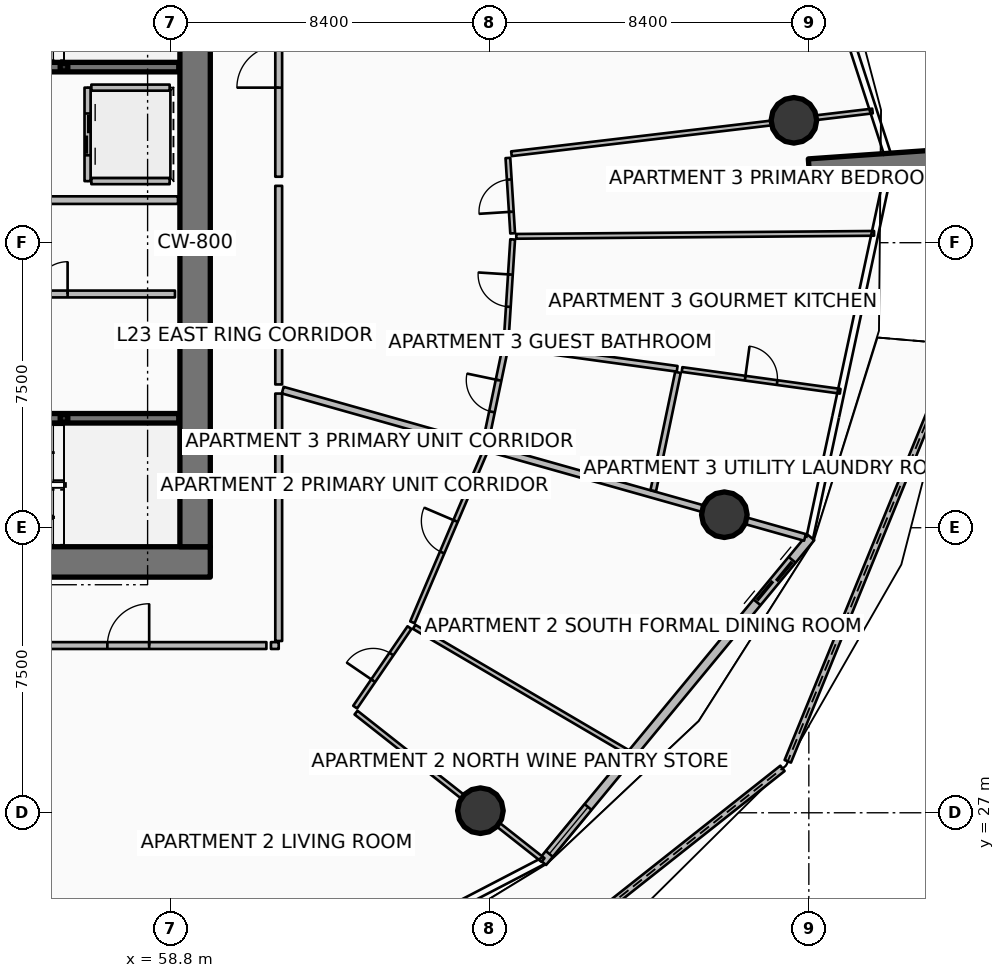
"""IFC4 building model, lengths in metres.
Left out: names, types, materials, properties, quantities, classifications, styles, units other than length and angle.
Written with IfcOpenShell. Run it as: python <this file> out.ifc"""

import sys

from ifc_helpers import new_model, si_unit, direction, frame, frame_2d, origin, origin_2d, place, context, subcontext, project, spatial, polyline, rectangle, hollow_rectangle, circle, outline, extrude, element, fill, save


model = new_model("IFC4")
c1 = context("Model", 3, precision=1e-05, world=origin(), true_north=direction((0.0, 1.0)))
c2 = subcontext(c1, "Body", "Model", "MODEL_VIEW")
j1 = project(units=[si_unit("LENGTHUNIT", "METRE"), si_unit("PLANEANGLEUNIT", "RADIAN")], contexts=[c1])
p1 = place(None, origin())
s1 = spatial("IfcSite", under=j1, at=p1, CompositionType="ELEMENT")
p2 = place(p1, origin())
s2 = spatial("IfcBuilding", under=s1, at=p2, CompositionType="ELEMENT")
p3 = place(p2, frame((0.0, 0.0, 93.9)))
s3 = spatial("IfcBuildingStorey", under=s2, at=p3, CompositionType="ELEMENT", Elevation=93.9)
p4 = place(p3, frame((49.95, 33.6, 0.0), z_axis=(0.0, 0.0, 1.0), x_axis=(1.0, 0.0, 0.0)))
e1 = element("IfcWall", 1, at=p4, inside=s3, PredefinedType="SHEAR", context=c2, shape_type="SweptSolid", body=[
    extrude(rectangle(XDim=9.9, YDim=0.8, at=frame_2d((4.95, 0.0))), origin(), (0.0, 0.0, 1.0), 3.75),
])
p5 = place(p3, frame((59.45, 34.0, 0.0), z_axis=(0.0, 0.0, 1.0), x_axis=(0.0, 1.0, 0.0)))
e2 = element("IfcWall", 2, at=p5, inside=s3, PredefinedType="SHEAR", context=c2, shape_type="SweptSolid", body=[
    extrude(rectangle(XDim=16.0, YDim=0.8, at=frame_2d((8.0, 0.0))), origin(), (0.0, 0.0, 1.0), 3.75),
])
for number, where, z_axis, x_axis in (
    (3, (56.0, 46.62, 0.0), (0.0, 0.0, 1.0), (1.0, 0.0, 0.0)),
    (4, (56.0, 37.38, 0.0), (0.0, 0.0, 1.0), (1.0, 0.0, 0.0)),
):
    element("IfcColumn", number, at=place(p3, frame(where, z_axis=z_axis, x_axis=x_axis)), inside=s3, PredefinedType="COLUMN", context=c2, shape_type="SweptSolid", body=[
        extrude(hollow_rectangle(XDim=0.2, YDim=0.2, WallThickness=0.01, InnerFilletRadius=0.01, OuterFilletRadius=0.02, at=origin_2d()), origin(), (0.0, 0.0, 1.0), 1.67),
    ])
p6 = place(p3, frame((75.606, 43.93, 0.0), z_axis=(0.0, 0.0, 1.0), x_axis=(0.997564163539, 0.069754853754, 0.0)))
e5 = element("IfcWall", 5, at=p6, inside=s3, PredefinedType="SOLIDWALL", context=c2, shape_type="SweptSolid", body=[
    extrude(rectangle(XDim=3.5, YDim=0.55, at=frame_2d((1.75, 0.0))), origin(), (0.0, 0.0, 1.0), 3.75),
])
for number, where, z_axis, x_axis in (
    (6, (66.958, 27.055, 0.0), (0.0, 0.0, 1.0), (1.0, 0.0, 0.0)),
    (7, (73.377, 34.843, 0.0), (0.0, 0.0, 1.0), (1.0, 0.0, 0.0)),
    (8, (75.207, 45.22, 0.0), (0.0, 0.0, 1.0), (1.0, 0.0, 0.0)),
):
    element("IfcColumn", number, at=place(p3, frame(where, z_axis=z_axis, x_axis=x_axis)), inside=s3, PredefinedType="COLUMN", context=c2, shape_type="SweptSolid", body=[
        extrude(circle(Radius=0.6, at=origin_2d()), origin(), (0.0, 0.0, 1.0), 3.5),
    ])
p7 = place(p3, frame((66.031, 21.148, 0.0), z_axis=(0.0, 0.0, 1.0), x_axis=(0.784321358075, 0.620354743084, 0.0)))
e9 = element("IfcWall", 9, at=p7, inside=s3, PredefinedType="PARAPET", context=c2, shape_type="SweptSolid", body=[
    extrude(outline(polyline([(0.0, 0.0), (11.316, 0.0), (11.316, 1.832), (5.658, 1.853), (0.0, 1.756), (0.0, 0.0)])), frame((0.0, 0.09, 0.0), z_axis=(0.0, -1.0, 0.0), x_axis=(1.0, 0.0, 0.0)), (0.0, 0.0, 1.0), 0.18),
])
p8 = place(p3, frame((75.046, 28.354, 0.0), z_axis=(0.0, 0.0, 1.0), x_axis=(0.378274271274, 0.925693564681, 0.0)))
e10 = element("IfcWall", 10, at=p8, inside=s3, PredefinedType="PARAPET", context=c2, shape_type="SweptSolid", body=[
    extrude(outline(polyline([(0.0, 0.0), (11.852, 0.0), (11.852, 1.497), (5.926, 1.696), (0.0, 1.832), (0.0, 0.0)])), frame((0.0, 0.09, 0.0), z_axis=(0.0, -1.0, 0.0), x_axis=(1.0, 0.0, 0.0)), (0.0, 0.0, 1.0), 0.18),
])
p9 = place(p3, frame((68.593, 25.702, 0.0), z_axis=(0.0, 0.0, 1.0), x_axis=(0.636704975, 0.771107498868, 0.0)))
e11 = element("IfcWall", 11, at=p9, inside=s3, PredefinedType="SOLIDWALL", context=c2, shape_type="SweptSolid", body=[
    extrude(rectangle(XDim=11.084, YDim=0.24, at=frame_2d((5.542, 0.0))), origin(), (0.0, 0.0, 1.0), 2.45),
])
p10 = place(p9, frame((8.864, 0.0, 0.0)))
e12 = element("IfcOpeningElement", 12, at=p10, cuts=e11, PredefinedType="OPENING", context=c2, shape_type="SweptSolid", body=[
    extrude(rectangle(XDim=1.45, YDim=2.15, at=frame_2d((0.725, 1.075))), frame((0.0, 0.13, 0.0), z_axis=(0.0, -1.0, 0.0), x_axis=(1.0, 0.0, 0.0)), (0.0, 0.0, 1.0), 0.26),
])
p11 = place(p9, frame((0.28, 0.0, 0.65)))
e13 = element("IfcOpeningElement", 13, at=p11, cuts=e11, PredefinedType="OPENING", context=c2, shape_type="SweptSolid", body=[
    extrude(rectangle(XDim=1.6, YDim=1.5, at=frame_2d((0.8, 0.75))), frame((0.0, 0.13, 0.0), z_axis=(0.0, -1.0, 0.0), x_axis=(1.0, 0.0, 0.0)), (0.0, 0.0, 1.0), 0.26),
])
p12 = place(p3, frame((51.48, 46.62, 0.0), z_axis=(0.0, 0.0, 1.0), x_axis=(1.0, 0.0, 0.0)))
e14 = element("IfcWall", 14, at=p12, inside=s3, PredefinedType="SOLIDWALL", context=c2, shape_type="SweptSolid", body=[
    extrude(rectangle(XDim=7.54, YDim=0.25, at=frame_2d((3.77, 0.0))), origin(), (0.0, 0.0, 1.0), 3.5),
])
p13 = place(p12, frame((0.3, 0.0, 0.0)))
e15 = element("IfcOpeningElement", 15, at=p13, cuts=e14, PredefinedType="OPENING", context=c2, shape_type="SweptSolid", body=[
    extrude(rectangle(XDim=1.55, YDim=2.15, at=frame_2d((0.775, 1.075))), frame((0.0, 0.135, 0.0), z_axis=(0.0, -1.0, 0.0), x_axis=(1.0, 0.0, 0.0)), (0.0, 0.0, 1.0), 0.27),
])
p14 = place(p3, frame((51.48, 37.38, 0.0), z_axis=(0.0, 0.0, 1.0), x_axis=(1.0, 0.0, 0.0)))
e16 = element("IfcWall", 16, at=p14, inside=s3, PredefinedType="SOLIDWALL", context=c2, shape_type="SweptSolid", body=[
    extrude(rectangle(XDim=7.54, YDim=0.25, at=frame_2d((3.77, 0.0))), origin(), (0.0, 0.0, 1.0), 3.5),
])
p15 = place(p14, frame((0.3, 0.0, 0.0)))
e17 = element("IfcOpeningElement", 17, at=p15, cuts=e16, PredefinedType="OPENING", context=c2, shape_type="SweptSolid", body=[
    extrude(rectangle(XDim=1.55, YDim=2.15, at=frame_2d((0.775, 1.075))), frame((0.0, 0.135, 0.0), z_axis=(0.0, -1.0, 0.0), x_axis=(1.0, 0.0, 0.0)), (0.0, 0.0, 1.0), 0.27),
])
p16 = place(p3, frame((56.62, 46.08, 0.0), z_axis=(0.0, 0.0, 1.0), x_axis=(0.0, -1.0, 0.0)))
e18 = element("IfcWall", 18, at=p16, inside=s3, PredefinedType="PARTITIONING", context=c2, shape_type="SweptSolid", body=[
    extrude(rectangle(XDim=2.46, YDim=0.16, at=frame_2d((1.23, 0.0))), origin(), (0.0, 0.0, 1.0), 3.5),
])
p17 = place(p16, frame((0.68, 0.0, 0.0)))
e19 = element("IfcOpeningElement", 19, at=p17, cuts=e18, PredefinedType="OPENING", context=c2, shape_type="SweptSolid", body=[
    extrude(rectangle(XDim=1.1, YDim=2.1, at=frame_2d((0.55, 1.05))), frame((0.0, 0.09, 0.0), z_axis=(0.0, -1.0, 0.0), x_axis=(1.0, 0.0, 0.0)), (0.0, 0.0, 1.0), 0.18),
])
for number, where, z_axis, x_axis in (
    (20, (56.72, 46.08, 0.0), (0.0, 0.0, 1.0), (1.0, 0.0, 0.0)),
    (21, (56.72, 43.62, 0.0), (0.0, 0.0, 1.0), (1.0, 0.0, 0.0)),
):
    element("IfcWall", number, at=place(p3, frame(where, z_axis=z_axis, x_axis=x_axis)), inside=s3, PredefinedType="PARTITIONING", context=c2, shape_type="SweptSolid", body=[
        extrude(rectangle(XDim=2.06, YDim=0.16, at=frame_2d((1.03, 0.0))), origin(), (0.0, 0.0, 1.0), 3.5),
    ])
p18 = place(p3, frame((52.42, 40.65, 0.0), z_axis=(0.0, 0.0, 1.0), x_axis=(1.0, 0.0, 0.0)))
e22 = element("IfcWall", 22, at=p18, inside=s3, PredefinedType="PARTITIONING", context=c2, shape_type="SweptSolid", body=[
    extrude(rectangle(XDim=6.5, YDim=0.18, at=frame_2d((3.25, 0.0))), origin(), (0.0, 0.0, 1.0), 3.5),
])
p19 = place(p18, frame((2.825, 0.0, 0.0)))
e23 = element("IfcOpeningElement", 23, at=p19, cuts=e22, PredefinedType="OPENING", context=c2, shape_type="SweptSolid", body=[
    extrude(rectangle(XDim=0.85, YDim=2.06, at=frame_2d((0.425, 1.03))), frame((0.0, 0.1, 0.0), z_axis=(0.0, -1.0, 0.0), x_axis=(1.0, 0.0, 0.0)), (0.0, 0.0, 1.0), 0.2),
])
p20 = place(p3, frame((50.12, 43.12, 0.0), z_axis=(0.0, 0.0, 1.0), x_axis=(1.0, 0.0, 0.0)))
e24 = element("IfcWall", 24, at=p20, inside=s3, PredefinedType="PARTITIONING", context=c2, shape_type="SweptSolid", body=[
    extrude(rectangle(XDim=8.88, YDim=0.2, at=frame_2d((4.44, 0.0))), origin(), (0.0, 0.0, 1.0), 3.5),
])
p21 = place(p3, frame((61.756, 38.12, 0.0), z_axis=(0.0, 0.0, 1.0), x_axis=(0.962455861176, -0.271438234756, 0.0)))
e25 = element("IfcWall", 25, at=p21, inside=s3, PredefinedType="PARTITIONING", context=c2, shape_type="SweptSolid", body=[
    extrude(rectangle(XDim=14.279, YDim=0.18, at=frame_2d((7.139, 0.0))), origin(), (0.0, 0.0, 1.0), 2.94),
])
p22 = place(p3, frame((54.056, 31.4, 0.0), z_axis=(0.0, 0.0, 1.0), x_axis=(1.0, 0.0, 0.0)))
e26 = element("IfcWall", 26, at=p22, inside=s3, PredefinedType="PARTITIONING", context=c2, shape_type="SweptSolid", body=[
    extrude(rectangle(XDim=7.27, YDim=0.18, at=frame_2d((3.635, 0.0))), origin(), (0.0, 0.0, 1.0), 2.94),
])
p23 = place(p22, frame((3.085, 0.0, 0.0)))
e27 = element("IfcOpeningElement", 27, at=p23, cuts=e26, PredefinedType="OPENING", context=c2, shape_type="SweptSolid", body=[
    extrude(rectangle(XDim=1.1, YDim=2.1, at=frame_2d((0.55, 1.05))), frame((0.0, 0.1, 0.0), z_axis=(0.0, -1.0, 0.0), x_axis=(1.0, 0.0, 0.0)), (0.0, 0.0, 1.0), 0.2),
])
p24 = place(p3, frame((61.446, 31.4, 0.0), z_axis=(0.0, 0.0, 1.0), x_axis=(1.0, 0.0, 0.0)))
e28 = element("IfcWall", 28, at=p24, inside=s3, PredefinedType="PARTITIONING", context=c2, shape_type="SweptSolid", body=[
    extrude(rectangle(XDim=0.204, YDim=0.18, at=frame_2d((0.102, 0.0))), origin(), (0.0, 0.0, 1.0), 2.94),
])
p25 = place(p3, frame((61.65, 31.52, 0.0), z_axis=(0.0, 0.0, 1.0), x_axis=(0.0, 1.0, 0.0)))
e29 = element("IfcWall", 29, at=p25, inside=s3, PredefinedType="PARTITIONING", context=c2, shape_type="SweptSolid", body=[
    extrude(rectangle(XDim=6.51, YDim=0.18, at=frame_2d((3.255, 0.0))), origin(), (0.0, 0.0, 1.0), 2.94),
])
p26 = place(p3, frame((63.684, 29.635, 0.0), z_axis=(0.0, 0.0, 1.0), x_axis=(0.785296487737, -0.619119880434, 0.0)))
e30 = element("IfcWall", 30, at=p26, inside=s3, PredefinedType="PARTITIONING", context=c2, shape_type="SweptSolid", body=[
    extrude(rectangle(XDim=6.266, YDim=0.125, at=frame_2d((3.133, 0.0))), origin(), (0.0, 0.0, 1.0), 2.94),
])
p27 = place(p3, frame((65.214, 31.893, 0.0), z_axis=(0.0, 0.0, 1.0), x_axis=(0.862328516234, -0.506349217527, 0.0)))
e31 = element("IfcWall", 31, at=p27, inside=s3, PredefinedType="PARTITIONING", context=c2, shape_type="SweptSolid", body=[
    extrude(rectangle(XDim=6.506, YDim=0.125, at=frame_2d((3.253, 0.0))), origin(), (0.0, 0.0, 1.0), 2.94),
])
p28 = place(p3, frame((63.662, 29.78, 0.0), z_axis=(0.0, 0.0, 1.0), x_axis=(0.56409306427, 0.825711217583, 0.0)))
e32 = element("IfcWall", 32, at=p28, inside=s3, PredefinedType="PARTITIONING", context=c2, shape_type="SweptSolid", body=[
    extrude(rectangle(XDim=2.534, YDim=0.125, at=frame_2d((1.267, 0.0))), origin(), (0.0, 0.0, 1.0), 2.94),
])
p29 = place(p28, frame((0.842, 0.0, 0.0)))
e33 = element("IfcOpeningElement", 33, at=p29, cuts=e32, PredefinedType="OPENING", context=c2, shape_type="SweptSolid", body=[
    extrude(rectangle(XDim=0.85, YDim=2.06, at=frame_2d((0.425, 1.03))), frame((0.0, 0.073, 0.0), z_axis=(0.0, -1.0, 0.0), x_axis=(1.0, 0.0, 0.0)), (0.0, 0.0, 1.0), 0.145),
])
p30 = place(p3, frame((65.168, 32.012, 0.0), z_axis=(0.0, 0.0, 1.0), x_axis=(0.392094288326, 0.91992503448, 0.0)))
e34 = element("IfcWall", 34, at=p30, inside=s3, PredefinedType="PARTITIONING", context=c2, shape_type="SweptSolid", body=[
    extrude(rectangle(XDim=4.894, YDim=0.125, at=frame_2d((2.447, 0.0))), origin(), (0.0, 0.0, 1.0), 2.94),
])
p31 = place(p30, frame((1.997, 0.0, 0.0)))
e35 = element("IfcOpeningElement", 35, at=p31, cuts=e34, PredefinedType="OPENING", context=c2, shape_type="SweptSolid", body=[
    extrude(rectangle(XDim=0.9, YDim=2.08, at=frame_2d((0.45, 1.04))), frame((0.0, 0.073, 0.0), z_axis=(0.0, -1.0, 0.0), x_axis=(1.0, 0.0, 0.0)), (0.0, 0.0, 1.0), 0.145),
])
p32 = place(p3, frame((61.65, 43.736, 0.0), z_axis=(0.0, 0.0, 1.0), x_axis=(0.0, 1.0, 0.0)))
e36 = element("IfcWall", 36, at=p32, inside=s3, PredefinedType="PARTITIONING", context=c2, shape_type="SweptSolid", body=[
    extrude(rectangle(XDim=5.789, YDim=0.18, at=frame_2d((2.895, 0.0))), origin(), (0.0, 0.0, 1.0), 2.94),
])
p33 = place(p32, frame((2.344, 0.0, 0.0)))
e37 = element("IfcOpeningElement", 37, at=p33, cuts=e36, PredefinedType="OPENING", context=c2, shape_type="SweptSolid", body=[
    extrude(rectangle(XDim=1.1, YDim=2.1, at=frame_2d((0.55, 1.05))), frame((0.0, 0.1, 0.0), z_axis=(0.0, -1.0, 0.0), x_axis=(1.0, 0.0, 0.0)), (0.0, 0.0, 1.0), 0.2),
])
p34 = place(p3, frame((61.65, 38.27, 0.0), z_axis=(0.0, 0.0, 1.0), x_axis=(0.0, 1.0, 0.0)))
e38 = element("IfcWall", 38, at=p34, inside=s3, PredefinedType="PARTITIONING", context=c2, shape_type="SweptSolid", body=[
    extrude(rectangle(XDim=5.225, YDim=0.18, at=frame_2d((2.613, 0.0))), origin(), (0.0, 0.0, 1.0), 2.94),
])
p35 = place(p3, frame((67.774, 44.341, 0.0), z_axis=(0.0, 0.0, 1.0), x_axis=(0.993071471329, 0.117511926341, 0.0)))
e39 = element("IfcWall", 39, at=p35, inside=s3, PredefinedType="PARTITIONING", context=c2, shape_type="SweptSolid", body=[
    extrude(rectangle(XDim=9.567, YDim=0.125, at=frame_2d((4.784, 0.0))), origin(), (0.0, 0.0, 1.0), 2.94),
])
p36 = place(p3, frame((67.089, 36.72, 0.0), z_axis=(0.0, 0.0, 1.0), x_axis=(0.204314138463, 0.978905374806, 0.0)))
e40 = element("IfcWall", 40, at=p36, inside=s3, PredefinedType="PARTITIONING", context=c2, shape_type="SweptSolid", body=[
    extrude(rectangle(XDim=2.546, YDim=0.15, at=frame_2d((1.273, 0.0))), origin(), (0.0, 0.0, 1.0), 2.94),
])
p37 = place(p36, frame((0.848, 0.0, 0.0)))
e41 = element("IfcOpeningElement", 41, at=p37, cuts=e40, PredefinedType="OPENING", context=c2, shape_type="SweptSolid", body=[
    extrude(rectangle(XDim=0.85, YDim=2.06, at=frame_2d((0.425, 1.03))), frame((0.0, 0.085, 0.0), z_axis=(0.0, -1.0, 0.0), x_axis=(1.0, 0.0, 0.0)), (0.0, 0.0, 1.0), 0.17),
])
p38 = place(p3, frame((71.506, 35.474, 0.0), z_axis=(0.0, 0.0, 1.0), x_axis=(0.204346617078, 0.978898595407, 0.0)))
e42 = element("IfcWall", 42, at=p38, inside=s3, PredefinedType="PARTITIONING", context=c2, shape_type="SweptSolid", body=[
    extrude(rectangle(XDim=3.18, YDim=0.15, at=frame_2d((1.59, 0.0))), origin(), (0.0, 0.0, 1.0), 2.94),
])
p39 = place(p3, frame((67.717, 39.289, 0.0), z_axis=(0.0, 0.0, 1.0), x_axis=(0.99067496126, -0.136246545396, 0.0)))
e43 = element("IfcWall", 43, at=p39, inside=s3, PredefinedType="PARTITIONING", context=c2, shape_type="SweptSolid", body=[
    extrude(rectangle(XDim=4.46, YDim=0.15, at=frame_2d((2.23, 0.0))), origin(), (0.0, 0.0, 1.0), 2.94),
])
p40 = place(p3, frame((72.264, 38.663, 0.0), z_axis=(0.0, 0.0, 1.0), x_axis=(0.990677467282, -0.136228322381, 0.0)))
e44 = element("IfcWall", 44, at=p40, inside=s3, PredefinedType="PARTITIONING", context=c2, shape_type="SweptSolid", body=[
    extrude(rectangle(XDim=4.201, YDim=0.125, at=frame_2d((2.1, 0.0))), origin(), (0.0, 0.0, 1.0), 2.94),
])
p41 = place(p40, frame((1.675, 0.0, 0.0)))
e45 = element("IfcOpeningElement", 45, at=p41, cuts=e44, PredefinedType="OPENING", context=c2, shape_type="SweptSolid", body=[
    extrude(rectangle(XDim=0.85, YDim=2.06, at=frame_2d((0.425, 1.03))), frame((0.0, 0.073, 0.0), z_axis=(0.0, -1.0, 0.0), x_axis=(1.0, 0.0, 0.0)), (0.0, 0.0, 1.0), 0.145),
])
p42 = place(p3, frame((67.901, 42.167, 0.0), z_axis=(0.0, 0.0, 1.0), x_axis=(0.999964927596, 0.008375176238, 0.0)))
e46 = element("IfcWall", 46, at=p42, inside=s3, PredefinedType="PARTITIONING", context=c2, shape_type="SweptSolid", body=[
    extrude(rectangle(XDim=9.416, YDim=0.125, at=frame_2d((4.708, 0.0))), origin(), (0.0, 0.0, 1.0), 2.94),
])
p43 = place(p3, frame((67.633, 39.391, 0.0), z_axis=(0.0, 0.0, 1.0), x_axis=(0.064077427582, 0.997944929981, 0.0)))
e47 = element("IfcWall", 47, at=p43, inside=s3, PredefinedType="PARTITIONING", context=c2, shape_type="SweptSolid", body=[
    extrude(rectangle(XDim=2.701, YDim=0.125, at=frame_2d((1.351, 0.0))), origin(), (0.0, 0.0, 1.0), 2.94),
])
p44 = place(p43, frame((0.926, 0.0, 0.0)))
e48 = element("IfcOpeningElement", 48, at=p44, cuts=e47, PredefinedType="OPENING", context=c2, shape_type="SweptSolid", body=[
    extrude(rectangle(XDim=0.85, YDim=2.06, at=frame_2d((0.425, 1.03))), frame((0.0, 0.073, 0.0), z_axis=(0.0, -1.0, 0.0), x_axis=(1.0, 0.0, 0.0)), (0.0, 0.0, 1.0), 0.145),
])
p45 = place(p3, frame((67.806, 42.246, 0.0), z_axis=(0.0, 0.0, 1.0), x_axis=(-0.06315855722, 0.998003505329, 0.0)))
e49 = element("IfcWall", 49, at=p45, inside=s3, PredefinedType="PARTITIONING", context=c2, shape_type="SweptSolid", body=[
    extrude(rectangle(XDim=1.987, YDim=0.125, at=frame_2d((0.993, 0.0))), origin(), (0.0, 0.0, 1.0), 2.94),
])
p46 = place(p45, frame((0.568, 0.0, 0.0)))
e50 = element("IfcOpeningElement", 50, at=p46, cuts=e49, PredefinedType="OPENING", context=c2, shape_type="SweptSolid", body=[
    extrude(rectangle(XDim=0.85, YDim=2.06, at=frame_2d((0.425, 1.03))), frame((0.0, 0.073, 0.0), z_axis=(0.0, -1.0, 0.0), x_axis=(1.0, 0.0, 0.0)), (0.0, 0.0, 1.0), 0.145),
])
p47 = place(p10, origin())
e51 = element("IfcDoor", 51, at=p47, inside=s3, OperationType="DOUBLE_DOOR_SLIDING", PredefinedType="DOOR", context=c2, shape_type="SweptSolid", body=[
    extrude(rectangle(XDim=1.45, YDim=2.15, at=frame_2d((0.725, 1.075))), frame((0.0, 0.025, 0.0), z_axis=(0.0, -1.0, 0.0), x_axis=(1.0, 0.0, 0.0)), (0.0, 0.0, 1.0), 0.05),
])
fill(e12, e51)
p48 = place(p11, origin())
e52 = element("IfcWindow", 52, at=p48, inside=s3, PartitioningType="SINGLE_PANEL", PredefinedType="WINDOW", context=c2, shape_type="SweptSolid", body=[
    extrude(rectangle(XDim=1.6, YDim=1.5, at=frame_2d((0.8, 0.75))), frame((0.0, 0.03, 0.0), z_axis=(0.0, -1.0, 0.0), x_axis=(1.0, 0.0, 0.0)), (0.0, 0.0, 1.0), 0.06),
])
fill(e13, e52)
p49 = place(p17, origin())
e53 = element("IfcDoor", 53, at=p49, inside=s3, OperationType="DOUBLE_DOOR_SLIDING", PredefinedType="DOOR", context=c2, shape_type="SweptSolid", body=[
    extrude(rectangle(XDim=1.1, YDim=2.1, at=frame_2d((0.55, 1.05))), frame((0.0, 0.025, 0.0), z_axis=(0.0, -1.0, 0.0), x_axis=(1.0, 0.0, 0.0)), (0.0, 0.0, 1.0), 0.05),
])
fill(e19, e53)
p50 = place(p19, origin())
e54 = element("IfcDoor", 54, at=p50, inside=s3, OperationType="SINGLE_SWING_RIGHT", PredefinedType="DOOR", context=c2, shape_type="SweptSolid", body=[
    extrude(rectangle(XDim=0.85, YDim=2.06, at=frame_2d((0.425, 1.03))), frame((0.0, 0.025, 0.0), z_axis=(0.0, -1.0, 0.0), x_axis=(1.0, 0.0, 0.0)), (0.0, 0.0, 1.0), 0.05),
])
fill(e23, e54)
p51 = place(p23, origin())
e55 = element("IfcDoor", 55, at=p51, inside=s3, OperationType="SINGLE_SWING_RIGHT", PredefinedType="DOOR", context=c2, shape_type="SweptSolid", body=[
    extrude(rectangle(XDim=1.1, YDim=2.1, at=frame_2d((0.55, 1.05))), frame((0.0, 0.025, 0.0), z_axis=(0.0, -1.0, 0.0), x_axis=(1.0, 0.0, 0.0)), (0.0, 0.0, 1.0), 0.05),
])
fill(e27, e55)
p52 = place(p29, origin())
e56 = element("IfcDoor", 56, at=p52, inside=s3, OperationType="SINGLE_SWING_LEFT", PredefinedType="DOOR", context=c2, shape_type="SweptSolid", body=[
    extrude(rectangle(XDim=0.85, YDim=2.06, at=frame_2d((0.425, 1.03))), frame((0.0, 0.025, 0.0), z_axis=(0.0, -1.0, 0.0), x_axis=(1.0, 0.0, 0.0)), (0.0, 0.0, 1.0), 0.05),
])
fill(e33, e56)
p53 = place(p31, origin())
e57 = element("IfcDoor", 57, at=p53, inside=s3, OperationType="SINGLE_SWING_RIGHT", PredefinedType="DOOR", context=c2, shape_type="SweptSolid", body=[
    extrude(rectangle(XDim=0.9, YDim=2.08, at=frame_2d((0.45, 1.04))), frame((0.0, 0.025, 0.0), z_axis=(0.0, -1.0, 0.0), x_axis=(1.0, 0.0, 0.0)), (0.0, 0.0, 1.0), 0.05),
])
fill(e35, e57)
p54 = place(p33, origin())
e58 = element("IfcDoor", 58, at=p54, inside=s3, OperationType="SINGLE_SWING_LEFT", PredefinedType="DOOR", context=c2, shape_type="SweptSolid", body=[
    extrude(rectangle(XDim=1.1, YDim=2.1, at=frame_2d((0.55, 1.05))), frame((0.0, 0.025, 0.0), z_axis=(0.0, -1.0, 0.0), x_axis=(1.0, 0.0, 0.0)), (0.0, 0.0, 1.0), 0.05),
])
fill(e37, e58)
p55 = place(p37, origin())
e59 = element("IfcDoor", 59, at=p55, inside=s3, OperationType="SINGLE_SWING_RIGHT", PredefinedType="DOOR", context=c2, shape_type="SweptSolid", body=[
    extrude(rectangle(XDim=0.85, YDim=2.06, at=frame_2d((0.425, 1.03))), frame((0.0, 0.025, 0.0), z_axis=(0.0, -1.0, 0.0), x_axis=(1.0, 0.0, 0.0)), (0.0, 0.0, 1.0), 0.05),
])
fill(e41, e59)
p56 = place(p41, origin())
e60 = element("IfcDoor", 60, at=p56, inside=s3, OperationType="SINGLE_SWING_LEFT", PredefinedType="DOOR", context=c2, shape_type="SweptSolid", body=[
    extrude(rectangle(XDim=0.85, YDim=2.06, at=frame_2d((0.425, 1.03))), frame((0.0, 0.025, 0.0), z_axis=(0.0, -1.0, 0.0), x_axis=(1.0, 0.0, 0.0)), (0.0, 0.0, 1.0), 0.05),
])
fill(e45, e60)
p57 = place(p44, origin())
e61 = element("IfcDoor", 61, at=p57, inside=s3, OperationType="SINGLE_SWING_RIGHT", PredefinedType="DOOR", context=c2, shape_type="SweptSolid", body=[
    extrude(rectangle(XDim=0.85, YDim=2.06, at=frame_2d((0.425, 1.03))), frame((0.0, 0.025, 0.0), z_axis=(0.0, -1.0, 0.0), x_axis=(1.0, 0.0, 0.0)), (0.0, 0.0, 1.0), 0.05),
])
fill(e48, e61)
p58 = place(p46, origin())
e62 = element("IfcDoor", 62, at=p58, inside=s3, OperationType="SINGLE_SWING_LEFT", PredefinedType="DOOR", context=c2, shape_type="SweptSolid", body=[
    extrude(rectangle(XDim=0.85, YDim=2.06, at=frame_2d((0.425, 1.03))), frame((0.0, 0.025, 0.0), z_axis=(0.0, -1.0, 0.0), x_axis=(1.0, 0.0, 0.0)), (0.0, 0.0, 1.0), 0.05),
])
fill(e50, e62)
save(model, sys.argv[1])
